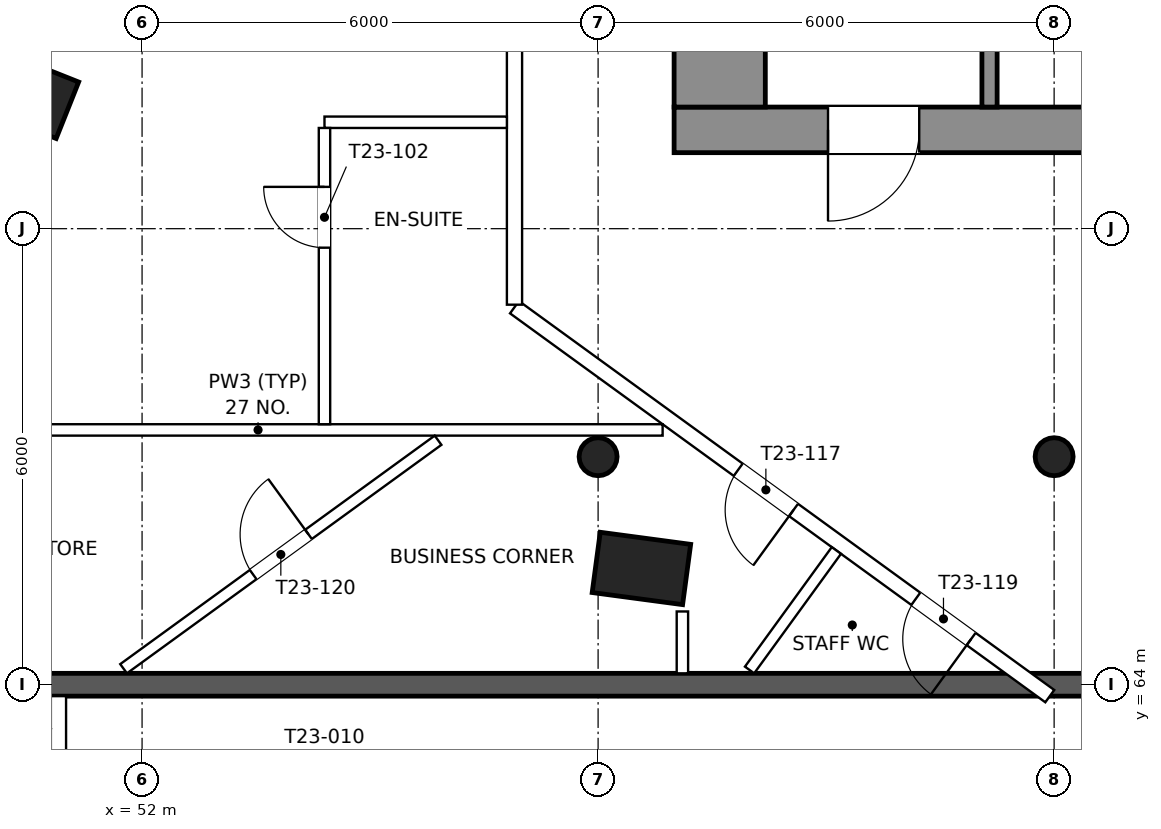
"""IFC4 building model, lengths in metres.
Left out: names, types, materials, properties, quantities, classifications, styles, units other than length and angle.
Written with IfcOpenShell. Run it as: python <this file> out.ifc"""

import sys

from ifc_helpers import new_model, si_unit, direction, frame, frame_2d, origin, origin_2d, place, context, subcontext, project, spatial, rectangle, circle, extrude, element, fill, save


model = new_model("IFC4")
c1 = context("Model", 3, precision=1e-05, world=origin(), true_north=direction((0.0, 1.0)))
c2 = subcontext(c1, "Body", "Model", "MODEL_VIEW")
j1 = project(units=[si_unit("LENGTHUNIT", "METRE"), si_unit("PLANEANGLEUNIT", "RADIAN")], contexts=[c1])
p1 = place(None, origin())
s1 = spatial("IfcSite", under=j1, at=p1, CompositionType="ELEMENT")
p2 = place(p1, origin())
s2 = spatial("IfcBuilding", under=s1, at=p2, CompositionType="ELEMENT")
p3 = place(p2, frame((0.0, 0.0, 317.8)))
s3 = spatial("IfcBuildingStorey", under=s2, at=p3, CompositionType="ELEMENT", Elevation=317.8)
for number, where, z_axis, x_axis in (
    (1, (50.46, 71.78, 0.0), (0.0, 0.0, 1.0), (0.37, 0.929, 0.0)),
    (2, (58.57, 65.53, 0.0), (0.0, 0.0, 1.0), (0.133, 0.991, 0.0)),
):
    element("IfcColumn", number, at=place(p3, frame(where, z_axis=z_axis, x_axis=x_axis)), inside=s3, PredefinedType="COLUMN", context=c2, shape_type="SweptSolid", body=[
        extrude(rectangle(XDim=0.8, YDim=1.2, at=origin_2d()), origin(), (0.0, 0.0, 1.0), 3.9),
    ])
for number, where, z_axis, x_axis in (
    (3, (58.0, 67.0, 0.0), (0.0, 0.0, 1.0), (1.0, 0.0, 0.0)),
    (4, (64.0, 67.0, 0.0), (0.0, 0.0, 1.0), (1.0, 0.0, 0.0)),
):
    element("IfcColumn", number, at=place(p3, frame(where, z_axis=z_axis, x_axis=x_axis)), inside=s3, PredefinedType="COLUMN", context=c2, shape_type="SweptSolid", body=[
        extrude(circle(Radius=0.25, at=origin_2d()), origin(), (0.0, 0.0, 1.0), 3.9),
    ])
p4 = place(p3, frame((53.479, 84.109, 0.0), z_axis=(0.0, 0.0, 1.0), x_axis=(-0.309018707068, -0.951055959806, 0.0)))
e5 = element("IfcWall", 5, at=p4, inside=s3, PredefinedType="SOLIDWALL", context=c2, shape_type="SweptSolid", body=[
    extrude(rectangle(XDim=17.619, YDim=0.32, at=frame_2d((8.81, 0.0))), origin(), (0.0, 0.0, 1.0), 3.5),
])
p5 = place(p4, frame((1.609, 0.0, 0.55)))
e6 = element("IfcOpeningElement", 6, at=p5, cuts=e5, PredefinedType="OPENING", context=c2, shape_type="SweptSolid", body=[
    extrude(rectangle(XDim=2.4, YDim=2.3, at=frame_2d((1.2, 1.15))), frame((0.0, 0.17, 0.0), z_axis=(0.0, -1.0, 0.0), x_axis=(1.0, 0.0, 0.0)), (0.0, 0.0, 1.0), 0.34),
])
p6 = place(p4, frame((4.609, 0.0, 0.55)))
e7 = element("IfcOpeningElement", 7, at=p6, cuts=e5, PredefinedType="OPENING", context=c2, shape_type="SweptSolid", body=[
    extrude(rectangle(XDim=2.4, YDim=2.3, at=frame_2d((1.2, 1.15))), frame((0.0, 0.17, 0.0), z_axis=(0.0, -1.0, 0.0), x_axis=(1.0, 0.0, 0.0)), (0.0, 0.0, 1.0), 0.34),
])
p7 = place(p4, frame((7.609, 0.0, 0.55)))
e8 = element("IfcOpeningElement", 8, at=p7, cuts=e5, PredefinedType="OPENING", context=c2, shape_type="SweptSolid", body=[
    extrude(rectangle(XDim=2.4, YDim=2.3, at=frame_2d((1.2, 1.15))), frame((0.0, 0.17, 0.0), z_axis=(0.0, -1.0, 0.0), x_axis=(1.0, 0.0, 0.0)), (0.0, 0.0, 1.0), 0.34),
])
p8 = place(p4, frame((10.609, 0.0, 0.55)))
e9 = element("IfcOpeningElement", 9, at=p8, cuts=e5, PredefinedType="OPENING", context=c2, shape_type="SweptSolid", body=[
    extrude(rectangle(XDim=2.4, YDim=2.3, at=frame_2d((1.2, 1.15))), frame((0.0, 0.17, 0.0), z_axis=(0.0, -1.0, 0.0), x_axis=(1.0, 0.0, 0.0)), (0.0, 0.0, 1.0), 0.34),
])
p9 = place(p4, frame((13.459, 0.0, 0.75)))
e10 = element("IfcOpeningElement", 10, at=p9, cuts=e5, PredefinedType="OPENING", context=c2, shape_type="SweptSolid", body=[
    extrude(rectangle(XDim=2.2, YDim=2.1, at=frame_2d((1.1, 1.05))), frame((0.0, 0.17, 0.0), z_axis=(0.0, -1.0, 0.0), x_axis=(1.0, 0.0, 0.0)), (0.0, 0.0, 1.0), 0.34),
])
p10 = place(p3, frame((59.0, 71.3, 0.0), z_axis=(0.0, 0.0, 1.0), x_axis=(1.0, 0.0, 0.0)))
e11 = element("IfcWall", 11, at=p10, inside=s3, PredefinedType="SHEAR", context=c2, shape_type="SweptSolid", body=[
    extrude(rectangle(XDim=22.0, YDim=0.6, at=frame_2d((11.0, 0.0))), origin(), (0.0, 0.0, 1.0), 3.9),
])
p11 = place(p10, frame((2.025, 0.0, 0.0)))
e12 = element("IfcOpeningElement", 12, at=p11, cuts=e11, PredefinedType="OPENING", context=c2, shape_type="SweptSolid", body=[
    extrude(rectangle(XDim=1.2, YDim=2.1, at=frame_2d((0.6, 1.05))), frame((0.0, 0.31, 0.0), z_axis=(0.0, -1.0, 0.0), x_axis=(1.0, 0.0, 0.0)), (0.0, 0.0, 1.0), 0.62),
])
p12 = place(p10, frame((18.775, 0.0, 0.0)))
e13 = element("IfcOpeningElement", 13, at=p12, cuts=e11, PredefinedType="OPENING", context=c2, shape_type="SweptSolid", body=[
    extrude(rectangle(XDim=1.2, YDim=2.1, at=frame_2d((0.6, 1.05))), frame((0.0, 0.31, 0.0), z_axis=(0.0, -1.0, 0.0), x_axis=(1.0, 0.0, 0.0)), (0.0, 0.0, 1.0), 0.62),
])
p13 = place(p10, frame((10.0, 0.0, 0.0)))
e14 = element("IfcOpeningElement", 14, at=p13, cuts=e11, PredefinedType="OPENING", context=c2, shape_type="SweptSolid", body=[
    extrude(rectangle(XDim=2.0, YDim=2.1, at=frame_2d((1.0, 1.05))), frame((0.0, 0.31, 0.0), z_axis=(0.0, -1.0, 0.0), x_axis=(1.0, 0.0, 0.0)), (0.0, 0.0, 1.0), 0.62),
])
p14 = place(p3, frame((59.6, 71.6, 0.0), z_axis=(0.0, 0.0, 1.0), x_axis=(0.0, 1.0, 0.0)))
e15 = element("IfcWall", 15, at=p14, inside=s3, PredefinedType="SHEAR", context=c2, shape_type="SweptSolid", body=[
    extrude(rectangle(XDim=9.3, YDim=1.2, at=frame_2d((4.65, 0.0))), origin(), (0.0, 0.0, 1.0), 3.9),
])
p15 = place(p3, frame((63.15, 71.6, 0.0), z_axis=(0.0, 0.0, 1.0), x_axis=(0.0, 1.0, 0.0)))
e16 = element("IfcWall", 16, at=p15, inside=s3, PredefinedType="SHEAR", context=c2, shape_type="SweptSolid", body=[
    extrude(rectangle(XDim=1.6, YDim=0.2, at=frame_2d((0.8, 0.0))), origin(), (0.0, 0.0, 1.0), 3.9),
])
p16 = place(p3, frame((49.292, 64.0, 0.0), z_axis=(0.0, 0.0, 1.0), x_axis=(1.0, 0.0, 0.0)))
e17 = element("IfcWall", 17, at=p16, inside=s3, PredefinedType="PARTITIONING", context=c2, shape_type="SweptSolid", body=[
    extrude(rectangle(XDim=41.415, YDim=0.3, at=frame_2d((20.708, 0.0))), origin(), (0.0, 0.0, 1.0), 3.0),
])
p17 = place(p16, frame((16.576, 0.0, 0.0)))
e18 = element("IfcOpeningElement", 18, at=p17, cuts=e17, PredefinedType="OPENING", context=c2, shape_type="SweptSolid", body=[
    extrude(rectangle(XDim=2.0, YDim=2.1, at=frame_2d((1.0, 1.05))), frame((0.0, 0.16, 0.0), z_axis=(0.0, -1.0, 0.0), x_axis=(1.0, 0.0, 0.0)), (0.0, 0.0, 1.0), 0.32),
])
p18 = place(p16, frame((22.839, 0.0, 0.0)))
e19 = element("IfcOpeningElement", 19, at=p18, cuts=e17, PredefinedType="OPENING", context=c2, shape_type="SweptSolid", body=[
    extrude(rectangle(XDim=2.0, YDim=2.1, at=frame_2d((1.0, 1.05))), frame((0.0, 0.16, 0.0), z_axis=(0.0, -1.0, 0.0), x_axis=(1.0, 0.0, 0.0)), (0.0, 0.0, 1.0), 0.32),
])
p19 = place(p3, frame((63.943, 63.85, 0.0), z_axis=(0.0, 0.0, 1.0), x_axis=(-0.809024626779, 0.587774747046, 0.0)))
e20 = element("IfcWall", 20, at=p19, inside=s3, PredefinedType="PARTITIONING", context=c2, shape_type="SweptSolid", body=[
    extrude(rectangle(XDim=8.705, YDim=0.2, at=frame_2d((4.353, 0.0))), origin(), (0.0, 0.0, 1.0), 3.5),
])
p20 = place(p19, frame((4.167, 0.0, 0.0)))
e21 = element("IfcOpeningElement", 21, at=p20, cuts=e20, PredefinedType="OPENING", context=c2, shape_type="SweptSolid", body=[
    extrude(rectangle(XDim=0.9, YDim=2.1, at=frame_2d((0.45, 1.05))), frame((0.0, 0.11, 0.0), z_axis=(0.0, -1.0, 0.0), x_axis=(1.0, 0.0, 0.0)), (0.0, 0.0, 1.0), 0.22),
])
p21 = place(p19, frame((1.279, 0.0, 0.0)))
e22 = element("IfcOpeningElement", 22, at=p21, cuts=e20, PredefinedType="OPENING", context=c2, shape_type="SweptSolid", body=[
    extrude(rectangle(XDim=0.9, YDim=2.1, at=frame_2d((0.45, 1.05))), frame((0.0, 0.11, 0.0), z_axis=(0.0, -1.0, 0.0), x_axis=(1.0, 0.0, 0.0)), (0.0, 0.0, 1.0), 0.22),
])
p22 = place(p3, frame((56.9, 69.0, 0.0), z_axis=(0.0, 0.0, 1.0), x_axis=(0.0, 1.0, 0.0)))
e23 = element("IfcWall", 23, at=p22, inside=s3, PredefinedType="PARTITIONING", context=c2, shape_type="SweptSolid", body=[
    extrude(rectangle(XDim=17.396, YDim=0.2, at=frame_2d((8.698, 0.0))), origin(), (0.0, 0.0, 1.0), 3.05),
])
p23 = place(p22, frame((4.488, 0.0, 0.0)))
e24 = element("IfcOpeningElement", 24, at=p23, cuts=e23, PredefinedType="OPENING", context=c2, shape_type="SweptSolid", body=[
    extrude(rectangle(XDim=0.9, YDim=2.1, at=frame_2d((0.45, 1.05))), frame((0.0, 0.11, 0.0), z_axis=(0.0, -1.0, 0.0), x_axis=(1.0, 0.0, 0.0)), (0.0, 0.0, 1.0), 0.22),
])
p24 = place(p22, frame((11.294, 0.0, 0.0)))
e25 = element("IfcOpeningElement", 25, at=p24, cuts=e23, PredefinedType="OPENING", context=c2, shape_type="SweptSolid", body=[
    extrude(rectangle(XDim=0.9, YDim=2.1, at=frame_2d((0.45, 1.05))), frame((0.0, 0.11, 0.0), z_axis=(0.0, -1.0, 0.0), x_axis=(1.0, 0.0, 0.0)), (0.0, 0.0, 1.0), 0.22),
])
p25 = place(p22, frame((14.337, 0.0, 0.0)))
e26 = element("IfcOpeningElement", 26, at=p25, cuts=e23, PredefinedType="OPENING", context=c2, shape_type="SweptSolid", body=[
    extrude(rectangle(XDim=0.9, YDim=2.1, at=frame_2d((0.45, 1.05))), frame((0.0, 0.11, 0.0), z_axis=(0.0, -1.0, 0.0), x_axis=(1.0, 0.0, 0.0)), (0.0, 0.0, 1.0), 0.22),
])
p26 = place(p3, frame((50.9, 61.855, 0.0), z_axis=(0.0, 0.0, 1.0), x_axis=(0.0, 1.0, 0.0)))
e27 = element("IfcWall", 27, at=p26, inside=s3, PredefinedType="PARTITIONING", context=c2, shape_type="SweptSolid", body=[
    extrude(rectangle(XDim=1.995, YDim=0.2, at=frame_2d((0.997, 0.0))), origin(), (0.0, 0.0, 1.0), 3.5),
])
p27 = place(p3, frame((48.203, 67.352, 0.0), z_axis=(0.0, 0.0, 1.0), x_axis=(1.0, 0.0, 0.0)))
e28 = element("IfcWall", 28, at=p27, inside=s3, PredefinedType="PARTITIONING", context=c2, shape_type="SweptSolid", body=[
    extrude(rectangle(XDim=10.646, YDim=0.15, at=frame_2d((5.323, 0.0))), origin(), (0.0, 0.0, 1.0), 3.5),
])
p28 = place(p3, frame((51.757, 64.211, 0.0), z_axis=(0.0, 0.0, 1.0), x_axis=(0.809010552393, 0.587794118818, 0.0)))
e29 = element("IfcWall", 29, at=p28, inside=s3, PredefinedType="PARTITIONING", context=c2, shape_type="SweptSolid", body=[
    extrude(rectangle(XDim=5.114, YDim=0.15, at=frame_2d((2.557, 0.0))), origin(), (0.0, 0.0, 1.0), 3.5),
])
p29 = place(p28, frame((2.107, 0.0, 0.0)))
e30 = element("IfcOpeningElement", 30, at=p29, cuts=e29, PredefinedType="OPENING", context=c2, shape_type="SweptSolid", body=[
    extrude(rectangle(XDim=0.9, YDim=2.1, at=frame_2d((0.45, 1.05))), frame((0.0, 0.085, 0.0), z_axis=(0.0, -1.0, 0.0), x_axis=(1.0, 0.0, 0.0)), (0.0, 0.0, 1.0), 0.17),
])
p30 = place(p3, frame((56.8, 71.4, 0.0), z_axis=(0.0, 0.0, 1.0), x_axis=(-1.0, 0.0, 0.0)))
e31 = element("IfcWall", 31, at=p30, inside=s3, PredefinedType="PARTITIONING", context=c2, shape_type="SweptSolid", body=[
    extrude(rectangle(XDim=2.4, YDim=0.15, at=frame_2d((1.2, 0.0))), origin(), (0.0, 0.0, 1.0), 3.5),
])
p31 = place(p3, frame((54.4, 67.427, 0.0), z_axis=(0.0, 0.0, 1.0), x_axis=(0.0, 1.0, 0.0)))
e32 = element("IfcWall", 32, at=p31, inside=s3, PredefinedType="PARTITIONING", context=c2, shape_type="SweptSolid", body=[
    extrude(rectangle(XDim=3.897, YDim=0.15, at=frame_2d((1.949, 0.0))), origin(), (0.0, 0.0, 1.0), 3.5),
])
p32 = place(p31, frame((2.323, 0.0, 0.0)))
e33 = element("IfcOpeningElement", 33, at=p32, cuts=e32, PredefinedType="OPENING", context=c2, shape_type="SweptSolid", body=[
    extrude(rectangle(XDim=0.8, YDim=2.1, at=frame_2d((0.4, 1.05))), frame((0.0, 0.085, 0.0), z_axis=(0.0, -1.0, 0.0), x_axis=(1.0, 0.0, 0.0)), (0.0, 0.0, 1.0), 0.17),
])
p33 = place(p3, frame((59.993, 64.194, 0.0), z_axis=(0.0, 0.0, 1.0), x_axis=(0.587708459011, 0.809072782392, 0.0)))
e34 = element("IfcWall", 34, at=p33, inside=s3, PredefinedType="PARTITIONING", context=c2, shape_type="SweptSolid", body=[
    extrude(rectangle(XDim=1.943, YDim=0.15, at=frame_2d((0.972, 0.0))), origin(), (0.0, 0.0, 1.0), 3.5),
])
p34 = place(p3, frame((59.109, 64.964, 0.0), z_axis=(0.0, 0.0, 1.0), x_axis=(0.0, -1.0, 0.0)))
e35 = element("IfcWall", 35, at=p34, inside=s3, PredefinedType="PARTITIONING", context=c2, shape_type="SweptSolid", body=[
    extrude(rectangle(XDim=0.814, YDim=0.15, at=frame_2d((0.407, 0.0))), origin(), (0.0, 0.0, 1.0), 3.5),
])
p35 = place(p11, frame((1.2, 0.0, 0.0), z_axis=(0.0, 0.0, 1.0), x_axis=(-1.0, 0.0, 0.0)))
e36 = element("IfcDoor", 36, at=p35, inside=s3, OperationType="SINGLE_SWING_RIGHT", PredefinedType="DOOR", context=c2, shape_type="SweptSolid", body=[
    extrude(rectangle(XDim=1.2, YDim=2.1, at=frame_2d((0.6, 1.05))), frame((0.0, 0.025, 0.0), z_axis=(0.0, -1.0, 0.0), x_axis=(1.0, 0.0, 0.0)), (0.0, 0.0, 1.0), 0.05),
])
fill(e12, e36)
p36 = place(p32, origin())
e37 = element("IfcDoor", 37, at=p36, inside=s3, OperationType="SINGLE_SWING_RIGHT", PredefinedType="DOOR", context=c2, shape_type="SweptSolid", body=[
    extrude(rectangle(XDim=0.8, YDim=2.1, at=frame_2d((0.4, 1.05))), frame((0.0, 0.025, 0.0), z_axis=(0.0, -1.0, 0.0), x_axis=(1.0, 0.0, 0.0)), (0.0, 0.0, 1.0), 0.05),
])
fill(e33, e37)
p37 = place(p20, origin())
e38 = element("IfcDoor", 38, at=p37, inside=s3, OperationType="SINGLE_SWING_LEFT", PredefinedType="DOOR", context=c2, shape_type="SweptSolid", body=[
    extrude(rectangle(XDim=0.9, YDim=2.1, at=frame_2d((0.45, 1.05))), frame((0.0, 0.025, 0.0), z_axis=(0.0, -1.0, 0.0), x_axis=(1.0, 0.0, 0.0)), (0.0, 0.0, 1.0), 0.05),
])
fill(e21, e38)
p38 = place(p21, origin())
e39 = element("IfcDoor", 39, at=p38, inside=s3, OperationType="SINGLE_SWING_LEFT", PredefinedType="DOOR", context=c2, shape_type="SweptSolid", body=[
    extrude(rectangle(XDim=0.9, YDim=2.1, at=frame_2d((0.45, 1.05))), frame((0.0, 0.025, 0.0), z_axis=(0.0, -1.0, 0.0), x_axis=(1.0, 0.0, 0.0)), (0.0, 0.0, 1.0), 0.05),
])
fill(e22, e39)
p39 = place(p29, origin())
e40 = element("IfcDoor", 40, at=p39, inside=s3, OperationType="SINGLE_SWING_RIGHT", PredefinedType="DOOR", context=c2, shape_type="SweptSolid", body=[
    extrude(rectangle(XDim=0.9, YDim=2.1, at=frame_2d((0.45, 1.05))), frame((0.0, 0.025, 0.0), z_axis=(0.0, -1.0, 0.0), x_axis=(1.0, 0.0, 0.0)), (0.0, 0.0, 1.0), 0.05),
])
fill(e30, e40)
save(model, sys.argv[1])
